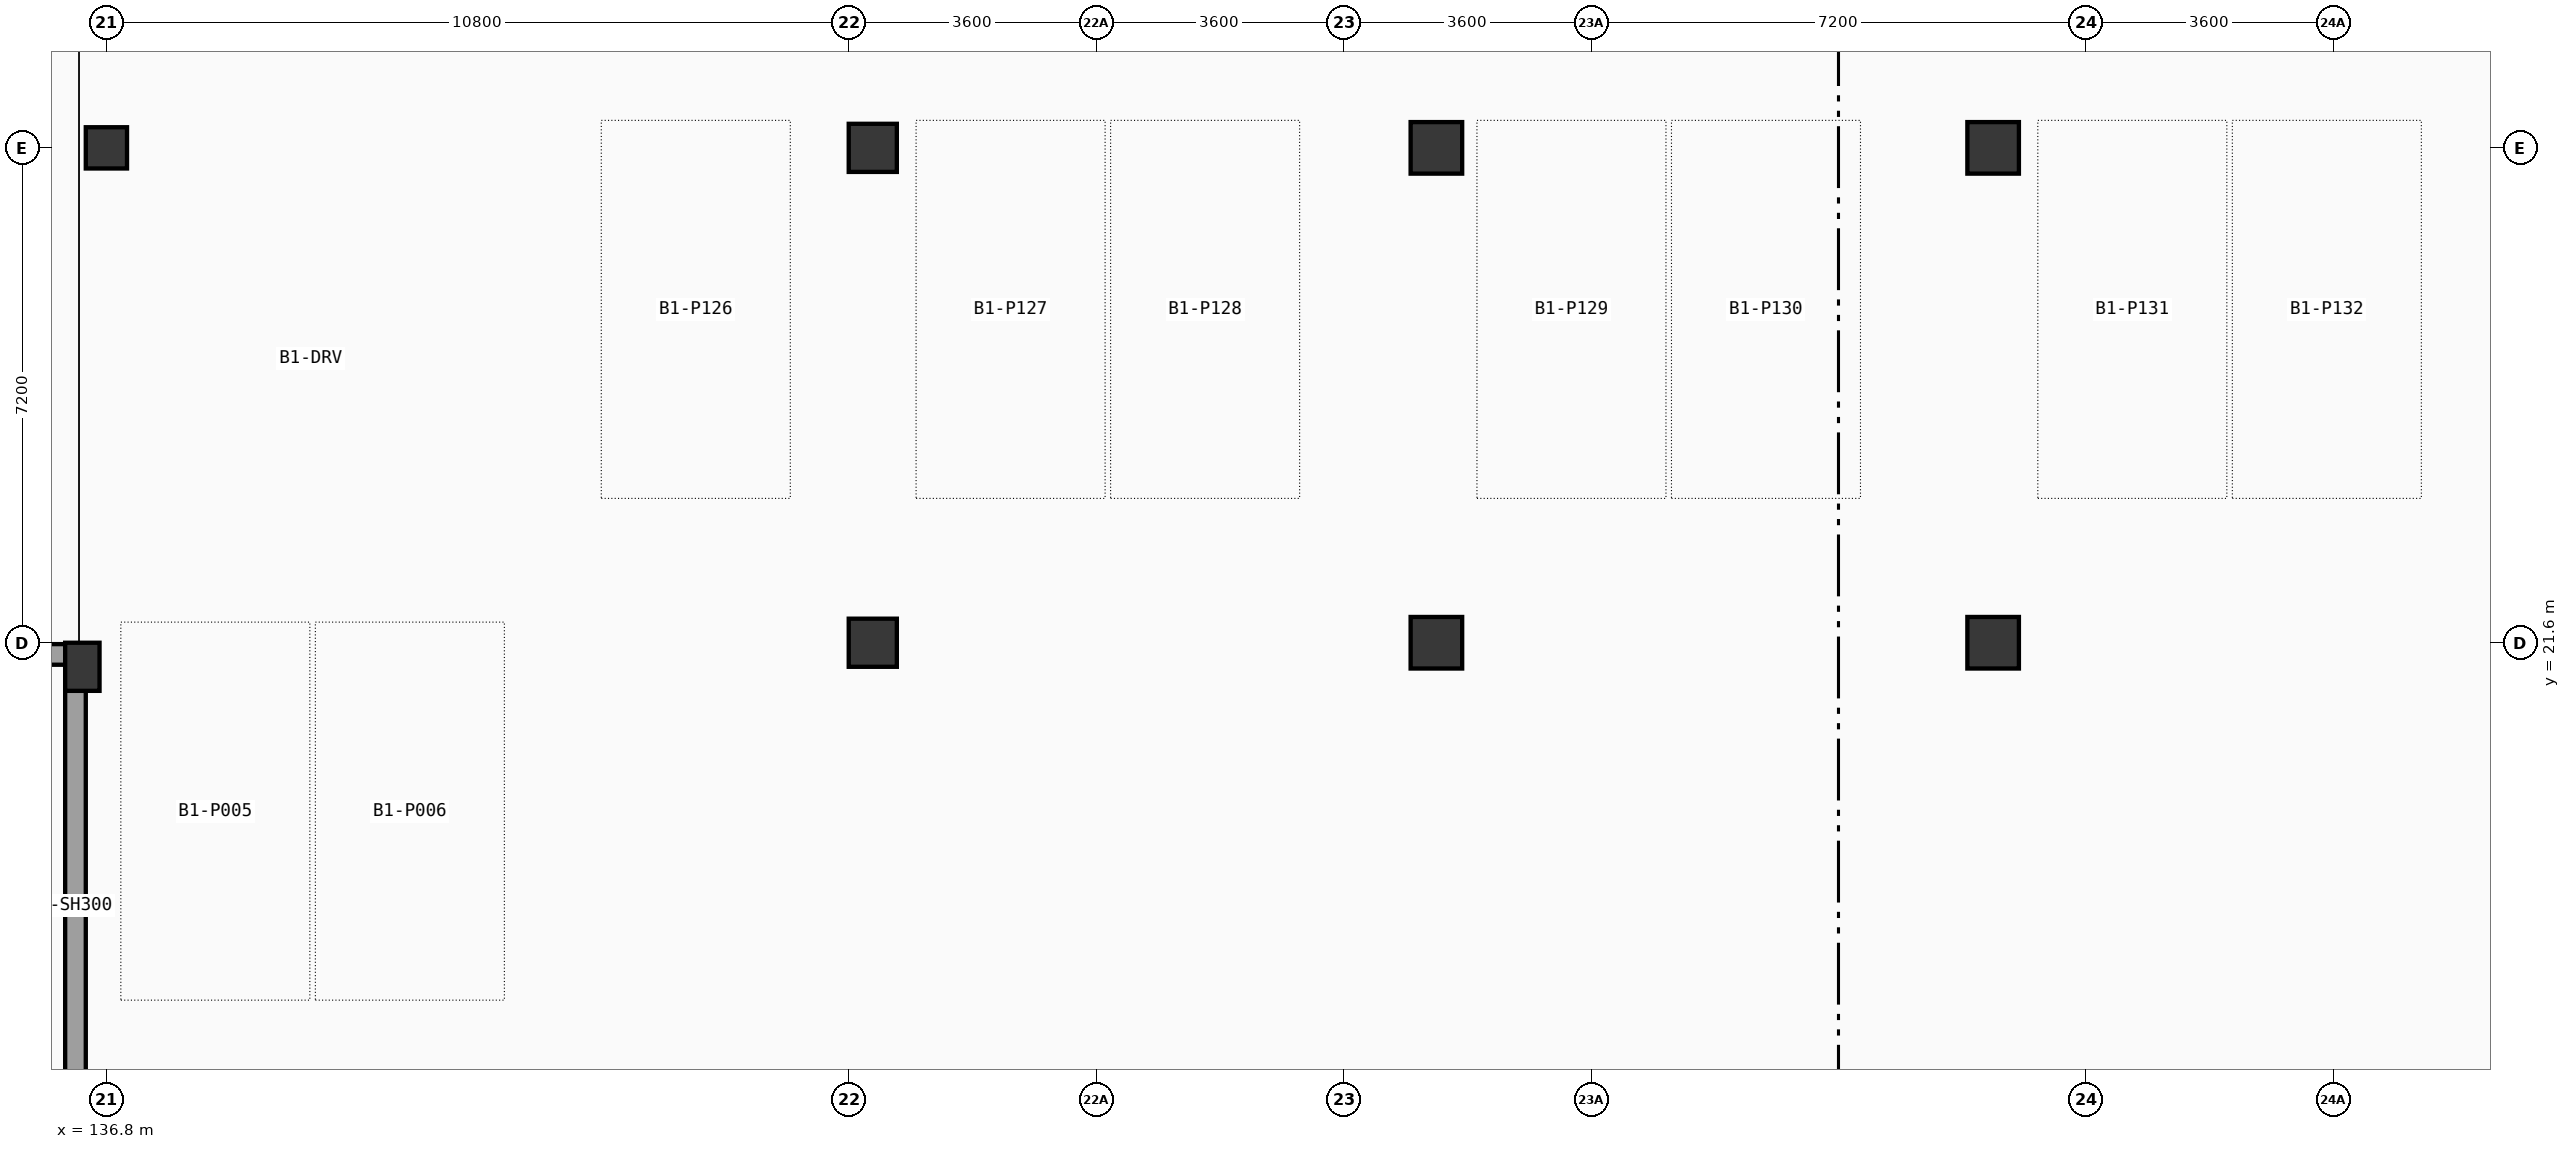
"""IFC4 building model, lengths in metres.
Left out: names, types, materials, properties, quantities, classifications, styles, units other than length and angle.
Written with IfcOpenShell. Run it as: python <this file> out.ifc"""

import sys

from ifc_helpers import new_model, si_unit, direction, frame, frame_2d, origin, origin_2d, place, context, subcontext, project, spatial, rectangle, extrude, element, save


model = new_model("IFC4")
c1 = context("Model", 3, precision=1e-05, world=origin(), true_north=direction((0.0, 1.0)))
c2 = subcontext(c1, "Body", "Model", "MODEL_VIEW")
j1 = project(units=[si_unit("LENGTHUNIT", "METRE"), si_unit("PLANEANGLEUNIT", "RADIAN")], contexts=[c1])
p1 = place(None, origin())
s1 = spatial("IfcSite", under=j1, at=p1, CompositionType="ELEMENT")
p2 = place(p1, origin())
s2 = spatial("IfcBuilding", under=s1, at=p2, CompositionType="ELEMENT")
p3 = place(p2, frame((0.0, 0.0, -4.2)))
s3 = spatial("IfcBuildingStorey", under=s2, at=p3, CompositionType="ELEMENT", Elevation=-4.2)
p4 = place(p3, frame((136.8, 28.8, 0.0), z_axis=(0.0, 0.0, 1.0), x_axis=(1.0, 0.0, 0.0)))
e1 = element("IfcColumn", 1, at=p4, inside=s3, PredefinedType="COLUMN", context=c2, shape_type="SweptSolid", body=[
    extrude(rectangle(XDim=0.6, YDim=0.6, at=origin_2d()), origin(), (0.0, 0.0, 1.0), 4.2),
])
for number, where, z_axis, x_axis in (
    (2, (147.95, 21.6, 0.0), (0.0, 0.0, 1.0), (1.0, 0.0, 0.0)),
    (3, (147.95, 28.8, 0.0), (0.0, 0.0, 1.0), (1.0, 0.0, 0.0)),
):
    element("IfcColumn", number, at=place(p3, frame(where, z_axis=z_axis, x_axis=x_axis)), inside=s3, PredefinedType="COLUMN", context=c2, shape_type="SweptSolid", body=[
        extrude(rectangle(XDim=0.7, YDim=0.7, at=origin_2d()), origin(), (0.0, 0.0, 1.0), 4.2),
    ])
for number, where, z_axis, x_axis in (
    (4, (156.15, 21.6, 0.0), (0.0, 0.0, 1.0), (1.0, 0.0, 0.0)),
    (5, (156.15, 28.8, 0.0), (0.0, 0.0, 1.0), (1.0, 0.0, 0.0)),
    (6, (164.25, 21.6, 0.0), (0.0, 0.0, 1.0), (1.0, 0.0, 0.0)),
    (7, (164.25, 28.8, 0.0), (0.0, 0.0, 1.0), (1.0, 0.0, 0.0)),
):
    element("IfcColumn", number, at=place(p3, frame(where, z_axis=z_axis, x_axis=x_axis)), inside=s3, PredefinedType="COLUMN", context=c2, shape_type="SweptSolid", body=[
        extrude(rectangle(XDim=0.75, YDim=0.75, at=origin_2d()), origin(), (0.0, 0.0, 1.0), 4.2),
    ])
p5 = place(p3, frame((136.45, 21.25, 0.0), z_axis=(0.0, 0.0, 1.0), x_axis=(1.0, 0.0, 0.0)))
e8 = element("IfcColumn", 8, at=p5, inside=s3, PredefinedType="COLUMN", context=c2, shape_type="SweptSolid", body=[
    extrude(rectangle(XDim=0.5, YDim=0.7, at=origin_2d()), origin(), (0.0, 0.0, 1.0), 4.2),
])
p6 = place(p3, frame((132.9, 21.43, 0.0), z_axis=(0.0, 0.0, 1.0), x_axis=(1.0, 0.0, 0.0)))
e9 = element("IfcWall", 9, at=p6, inside=s3, PredefinedType="SHEAR", context=c2, shape_type="SweptSolid", body=[
    extrude(rectangle(XDim=3.6, YDim=0.3, at=frame_2d((1.8, 0.0))), origin(), (0.0, 0.0, 1.0), 3.91),
])
p7 = place(p3, frame((136.35, 14.28, 0.0), z_axis=(0.0, 0.0, 1.0), x_axis=(0.0, 1.0, 0.0)))
e10 = element("IfcWall", 10, at=p7, inside=s3, PredefinedType="SHEAR", context=c2, shape_type="SweptSolid", body=[
    extrude(rectangle(XDim=7.0, YDim=0.3, at=frame_2d((3.5, 0.0))), origin(), (0.0, 0.0, 1.0), 3.91),
])
save(model, sys.argv[1])
